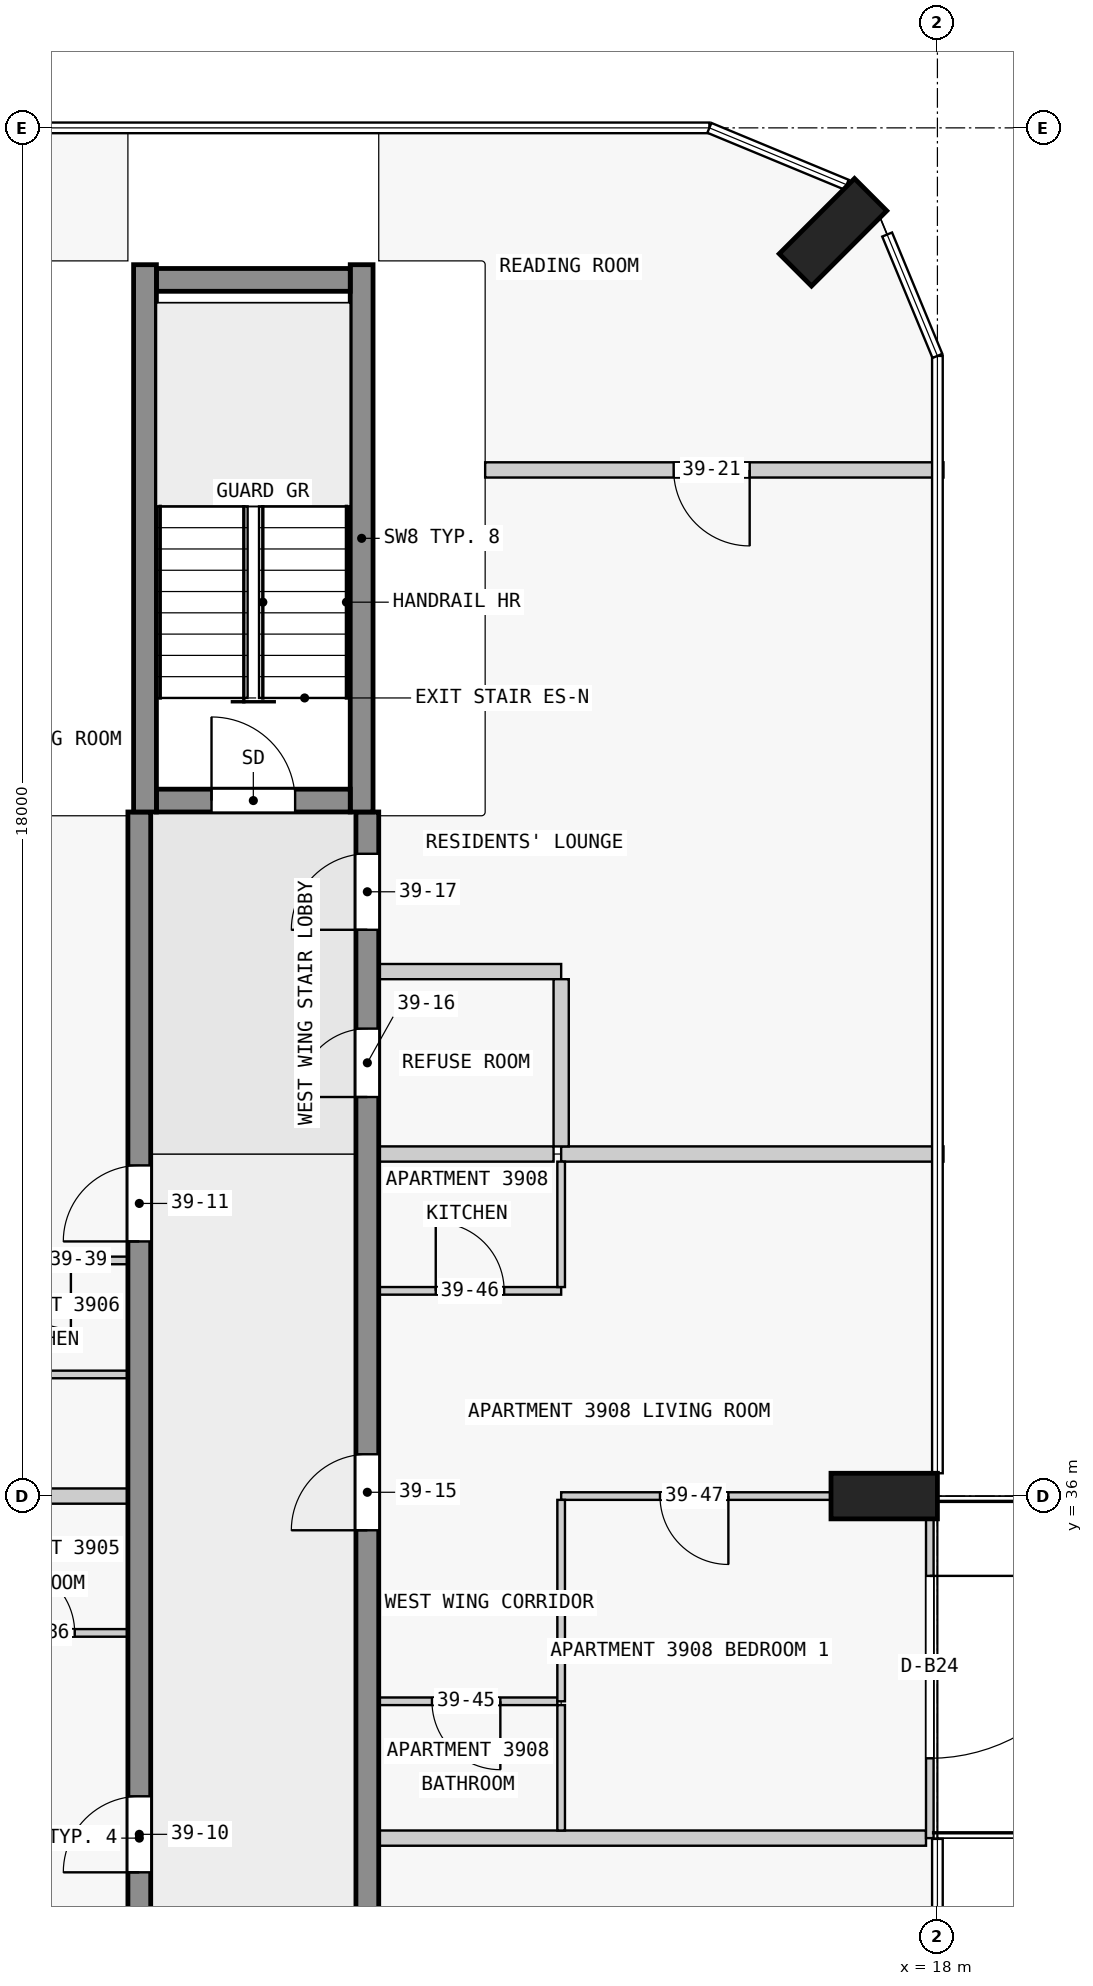
"""IFC4 building model, lengths in metres.
Left out: names, types, materials, properties, quantities, classifications, styles, units other than length and angle.
Written with IfcOpenShell. Run it as: python <this file> out.ifc"""

import sys

from ifc_helpers import new_model, si_unit, direction, frame, frame_2d, origin, origin_2d, place, context, subcontext, project, spatial, rectangle, extrude, element, fill, save


model = new_model("IFC4")
c1 = context("Model", 3, precision=1e-05, world=origin(), true_north=direction((0.0, 1.0)))
c2 = subcontext(c1, "Body", "Model", "MODEL_VIEW")
j1 = project(units=[si_unit("LENGTHUNIT", "METRE"), si_unit("PLANEANGLEUNIT", "RADIAN")], contexts=[c1])
p1 = place(None, origin())
s1 = spatial("IfcSite", under=j1, at=p1, CompositionType="ELEMENT")
p2 = place(p1, origin())
s2 = spatial("IfcBuilding", under=s1, at=p2, CompositionType="ELEMENT")
p3 = place(p2, frame((0.0, 0.0, 153.4)))
s3 = spatial("IfcBuildingStorey", under=s2, at=p3, CompositionType="ELEMENT", Elevation=153.4)
for number, where, z_axis, x_axis in (
    (1, (17.3, 36.0, 0.0), (0.0, 0.0, 1.0), (0.0, 1.0, 0.0)),
    (2, (16.626, 52.626, 0.0), (0.0, 0.0, 1.0), (-0.707, 0.707, 0.0)),
):
    element("IfcColumn", number, at=place(p3, frame(where, z_axis=z_axis, x_axis=x_axis)), inside=s3, PredefinedType="COLUMN", context=c2, shape_type="SweptSolid", body=[
        extrude(rectangle(XDim=0.6, YDim=1.4, at=origin_2d()), origin(), (0.0, 0.0, 1.0), 3.5),
    ])
p4 = place(p3, frame((7.725, 45.15, 0.0), z_axis=(0.0, 0.0, 1.0), x_axis=(1.0, 0.0, 0.0)))
e3 = element("IfcWall", 3, at=p4, inside=s3, PredefinedType="SHEAR", context=c2, shape_type="SweptSolid", body=[
    extrude(rectangle(XDim=2.55, YDim=0.3, at=frame_2d((1.275, 0.0))), origin(), (0.0, 0.0, 1.0), 3.5),
])
p5 = place(p4, frame((0.725, 0.0, 0.0)))
e4 = element("IfcOpeningElement", 4, at=p5, cuts=e3, PredefinedType="OPENING", context=c2, shape_type="SweptSolid", body=[
    extrude(rectangle(XDim=1.1, YDim=2.1, at=frame_2d((0.55, 1.05))), frame((0.0, 0.16, 0.0), z_axis=(0.0, -1.0, 0.0), x_axis=(1.0, 0.0, 0.0)), (0.0, 0.0, 1.0), 0.32),
])
p6 = place(p3, frame((7.725, 52.0, 0.0), z_axis=(0.0, 0.0, 1.0), x_axis=(1.0, 0.0, 0.0)))
e5 = element("IfcWall", 5, at=p6, inside=s3, PredefinedType="SHEAR", context=c2, shape_type="SweptSolid", body=[
    extrude(rectangle(XDim=2.55, YDim=0.3, at=frame_2d((1.275, 0.0))), origin(), (0.0, 0.0, 1.0), 3.5),
])
for number, where, z_axis, x_axis in (
    (6, (7.575, 45.0, 0.0), (0.0, 0.0, 1.0), (0.0, 1.0, 0.0)),
    (7, (10.425, 45.0, 0.0), (0.0, 0.0, 1.0), (0.0, 1.0, 0.0)),
):
    element("IfcWall", number, at=place(p3, frame(where, z_axis=z_axis, x_axis=x_axis)), inside=s3, PredefinedType="SHEAR", context=c2, shape_type="SweptSolid", body=[
        extrude(rectangle(XDim=7.2, YDim=0.3, at=frame_2d((3.6, 0.0))), origin(), (0.0, 0.0, 1.0), 3.5),
    ])
p7 = place(p3, frame((7.5, 18.0, 0.0), z_axis=(0.0, 0.0, 1.0), x_axis=(0.0, 1.0, 0.0)))
e8 = element("IfcWall", 8, at=p7, inside=s3, PredefinedType="SHEAR", context=c2, shape_type="SweptSolid", body=[
    extrude(rectangle(XDim=27.0, YDim=0.3, at=frame_2d((13.5, 0.0))), origin(), (0.0, 0.0, 1.0), 3.25),
])
p8 = place(p7, frame((1.75, 0.0, 0.0)))
e9 = element("IfcOpeningElement", 9, at=p8, cuts=e8, PredefinedType="OPENING", context=c2, shape_type="SweptSolid", body=[
    extrude(rectangle(XDim=1.0, YDim=2.1, at=frame_2d((0.5, 1.05))), frame((0.0, 0.16, 0.0), z_axis=(0.0, -1.0, 0.0), x_axis=(1.0, 0.0, 0.0)), (0.0, 0.0, 1.0), 0.32),
])
p9 = place(p7, frame((5.85, 0.0, 0.0)))
e10 = element("IfcOpeningElement", 10, at=p9, cuts=e8, PredefinedType="OPENING", context=c2, shape_type="SweptSolid", body=[
    extrude(rectangle(XDim=1.8, YDim=2.1, at=frame_2d((0.9, 1.05))), frame((0.0, 0.16, 0.0), z_axis=(0.0, -1.0, 0.0), x_axis=(1.0, 0.0, 0.0)), (0.0, 0.0, 1.0), 0.32),
])
p10 = place(p7, frame((13.05, 0.0, 0.0)))
e11 = element("IfcOpeningElement", 11, at=p10, cuts=e8, PredefinedType="OPENING", context=c2, shape_type="SweptSolid", body=[
    extrude(rectangle(XDim=1.0, YDim=2.1, at=frame_2d((0.5, 1.05))), frame((0.0, 0.16, 0.0), z_axis=(0.0, -1.0, 0.0), x_axis=(1.0, 0.0, 0.0)), (0.0, 0.0, 1.0), 0.32),
])
p11 = place(p7, frame((21.35, 0.0, 0.0)))
e12 = element("IfcOpeningElement", 12, at=p11, cuts=e8, PredefinedType="OPENING", context=c2, shape_type="SweptSolid", body=[
    extrude(rectangle(XDim=1.0, YDim=2.1, at=frame_2d((0.5, 1.05))), frame((0.0, 0.16, 0.0), z_axis=(0.0, -1.0, 0.0), x_axis=(1.0, 0.0, 0.0)), (0.0, 0.0, 1.0), 0.32),
])
p12 = place(p3, frame((10.5, 18.0, 0.0), z_axis=(0.0, 0.0, 1.0), x_axis=(0.0, 1.0, 0.0)))
e13 = element("IfcWall", 13, at=p12, inside=s3, PredefinedType="SHEAR", context=c2, shape_type="SweptSolid", body=[
    extrude(rectangle(XDim=27.0, YDim=0.3, at=frame_2d((13.5, 0.0))), origin(), (0.0, 0.0, 1.0), 3.25),
])
p13 = place(p12, frame((1.85, 0.0, 0.0)))
e14 = element("IfcOpeningElement", 14, at=p13, cuts=e13, PredefinedType="OPENING", context=c2, shape_type="SweptSolid", body=[
    extrude(rectangle(XDim=0.9, YDim=2.1, at=frame_2d((0.45, 1.05))), frame((0.0, 0.16, 0.0), z_axis=(0.0, -1.0, 0.0), x_axis=(1.0, 0.0, 0.0)), (0.0, 0.0, 1.0), 0.32),
])
p14 = place(p12, frame((6.25, 0.0, 0.0)))
e15 = element("IfcOpeningElement", 15, at=p14, cuts=e13, PredefinedType="OPENING", context=c2, shape_type="SweptSolid", body=[
    extrude(rectangle(XDim=1.0, YDim=2.1, at=frame_2d((0.5, 1.05))), frame((0.0, 0.16, 0.0), z_axis=(0.0, -1.0, 0.0), x_axis=(1.0, 0.0, 0.0)), (0.0, 0.0, 1.0), 0.32),
])
p15 = place(p12, frame((10.85, 0.0, 0.0)))
e16 = element("IfcOpeningElement", 16, at=p15, cuts=e13, PredefinedType="OPENING", context=c2, shape_type="SweptSolid", body=[
    extrude(rectangle(XDim=0.9, YDim=2.1, at=frame_2d((0.45, 1.05))), frame((0.0, 0.16, 0.0), z_axis=(0.0, -1.0, 0.0), x_axis=(1.0, 0.0, 0.0)), (0.0, 0.0, 1.0), 0.32),
])
p16 = place(p12, frame((17.55, 0.0, 0.0)))
e17 = element("IfcOpeningElement", 17, at=p16, cuts=e13, PredefinedType="OPENING", context=c2, shape_type="SweptSolid", body=[
    extrude(rectangle(XDim=1.0, YDim=2.1, at=frame_2d((0.5, 1.05))), frame((0.0, 0.16, 0.0), z_axis=(0.0, -1.0, 0.0), x_axis=(1.0, 0.0, 0.0)), (0.0, 0.0, 1.0), 0.32),
])
p17 = place(p12, frame((23.25, 0.0, 0.0)))
e18 = element("IfcOpeningElement", 18, at=p17, cuts=e13, PredefinedType="OPENING", context=c2, shape_type="SweptSolid", body=[
    extrude(rectangle(XDim=0.9, YDim=2.1, at=frame_2d((0.45, 1.05))), frame((0.0, 0.16, 0.0), z_axis=(0.0, -1.0, 0.0), x_axis=(1.0, 0.0, 0.0)), (0.0, 0.0, 1.0), 0.32),
])
p18 = place(p12, frame((25.45, 0.0, 0.0)))
e19 = element("IfcOpeningElement", 19, at=p18, cuts=e13, PredefinedType="OPENING", context=c2, shape_type="SweptSolid", body=[
    extrude(rectangle(XDim=1.0, YDim=2.1, at=frame_2d((0.5, 1.05))), frame((0.0, 0.16, 0.0), z_axis=(0.0, -1.0, 0.0), x_axis=(1.0, 0.0, 0.0)), (0.0, 0.0, 1.0), 0.32),
])
p19 = place(p3, frame((17.9, 36.0, 0.0), z_axis=(0.0, 0.0, 1.0), x_axis=(0.0, -1.0, 0.0)))
e20 = element("IfcWall", 20, at=p19, inside=s3, PredefinedType="STANDARD", context=c2, shape_type="SweptSolid", body=[
    extrude(rectangle(XDim=4.5, YDim=0.1, at=frame_2d((2.25, 0.0))), origin(), (0.0, 0.0, 1.0), 3.25),
])
p20 = place(p19, frame((1.05, 0.0, 0.0)))
e21 = element("IfcOpeningElement", 21, at=p20, cuts=e20, PredefinedType="OPENING", context=c2, shape_type="SweptSolid", body=[
    extrude(rectangle(XDim=2.4, YDim=2.4, at=frame_2d((1.2, 1.2))), frame((0.0, 0.06, 0.0), z_axis=(0.0, -1.0, 0.0), x_axis=(1.0, 0.0, 0.0)), (0.0, 0.0, 1.0), 0.12),
])
p21 = place(p3, frame((17.85, 31.5, 0.0), z_axis=(0.0, 0.0, 1.0), x_axis=(-1.0, 0.0, 0.0)))
e22 = element("IfcWall", 22, at=p21, inside=s3, PredefinedType="PARTITIONING", context=c2, shape_type="SweptSolid", body=[
    extrude(rectangle(XDim=7.2, YDim=0.2, at=frame_2d((3.6, 0.0))), origin(), (0.0, 0.0, 1.0), 3.25),
])
p22 = place(p3, frame((13.0, 33.3, 0.0), z_axis=(0.0, 0.0, 1.0), x_axis=(-1.0, 0.0, 0.0)))
e23 = element("IfcWall", 23, at=p22, inside=s3, PredefinedType="PARTITIONING", context=c2, shape_type="SweptSolid", body=[
    extrude(rectangle(XDim=2.35, YDim=0.1, at=frame_2d((1.175, 0.0))), origin(), (0.0, 0.0, 1.0), 3.25),
])
p23 = place(p22, frame((0.75, 0.0, 0.0)))
e24 = element("IfcOpeningElement", 24, at=p23, cuts=e23, PredefinedType="OPENING", context=c2, shape_type="SweptSolid", body=[
    extrude(rectangle(XDim=0.9, YDim=2.1, at=frame_2d((0.45, 1.05))), frame((0.0, 0.06, 0.0), z_axis=(0.0, -1.0, 0.0), x_axis=(1.0, 0.0, 0.0)), (0.0, 0.0, 1.0), 0.12),
])
p24 = place(p3, frame((5.0, 34.2, 0.0), z_axis=(0.0, 0.0, 1.0), x_axis=(1.0, 0.0, 0.0)))
e25 = element("IfcWall", 25, at=p24, inside=s3, PredefinedType="PARTITIONING", context=c2, shape_type="SweptSolid", body=[
    extrude(rectangle(XDim=2.35, YDim=0.1, at=frame_2d((1.175, 0.0))), origin(), (0.0, 0.0, 1.0), 3.25),
])
p25 = place(p24, frame((0.75, 0.0, 0.0)))
e26 = element("IfcOpeningElement", 26, at=p25, cuts=e25, PredefinedType="OPENING", context=c2, shape_type="SweptSolid", body=[
    extrude(rectangle(XDim=0.9, YDim=2.1, at=frame_2d((0.45, 1.05))), frame((0.0, 0.06, 0.0), z_axis=(0.0, -1.0, 0.0), x_axis=(1.0, 0.0, 0.0)), (0.0, 0.0, 1.0), 0.12),
])
p26 = place(p3, frame((16.6, 36.0, 0.0), z_axis=(0.0, 0.0, 1.0), x_axis=(-1.0, 0.0, 0.0)))
e27 = element("IfcWall", 27, at=p26, inside=s3, PredefinedType="PARTITIONING", context=c2, shape_type="SweptSolid", body=[
    extrude(rectangle(XDim=3.55, YDim=0.1, at=frame_2d((1.775, 0.0))), origin(), (0.0, 0.0, 1.0), 3.25),
])
p27 = place(p26, frame((1.35, 0.0, 0.0)))
e28 = element("IfcOpeningElement", 28, at=p27, cuts=e27, PredefinedType="OPENING", context=c2, shape_type="SweptSolid", body=[
    extrude(rectangle(XDim=0.9, YDim=2.1, at=frame_2d((0.45, 1.05))), frame((0.0, 0.06, 0.0), z_axis=(0.0, -1.0, 0.0), x_axis=(1.0, 0.0, 0.0)), (0.0, 0.0, 1.0), 0.12),
])
p28 = place(p3, frame((7.35, 36.0, 0.0), z_axis=(0.0, 0.0, 1.0), x_axis=(-1.0, 0.0, 0.0)))
e29 = element("IfcWall", 29, at=p28, inside=s3, PredefinedType="PARTITIONING", context=c2, shape_type="SweptSolid", body=[
    extrude(rectangle(XDim=5.95, YDim=0.2, at=frame_2d((2.975, 0.0))), origin(), (0.0, 0.0, 1.0), 3.25),
])
p29 = place(p3, frame((7.35, 37.6, 0.0), z_axis=(0.0, 0.0, 1.0), x_axis=(-1.0, 0.0, 0.0)))
e30 = element("IfcWall", 30, at=p29, inside=s3, PredefinedType="PARTITIONING", context=c2, shape_type="SweptSolid", body=[
    extrude(rectangle(XDim=2.35, YDim=0.1, at=frame_2d((1.175, 0.0))), origin(), (0.0, 0.0, 1.0), 3.25),
])
p30 = place(p3, frame((10.65, 38.7, 0.0), z_axis=(0.0, 0.0, 1.0), x_axis=(1.0, 0.0, 0.0)))
e31 = element("IfcWall", 31, at=p30, inside=s3, PredefinedType="PARTITIONING", context=c2, shape_type="SweptSolid", body=[
    extrude(rectangle(XDim=2.4, YDim=0.1, at=frame_2d((1.2, 0.0))), origin(), (0.0, 0.0, 1.0), 3.25),
])
p31 = place(p30, frame((0.75, 0.0, 0.0)))
e32 = element("IfcOpeningElement", 32, at=p31, cuts=e31, PredefinedType="OPENING", context=c2, shape_type="SweptSolid", body=[
    extrude(rectangle(XDim=0.9, YDim=2.1, at=frame_2d((0.45, 1.05))), frame((0.0, 0.06, 0.0), z_axis=(0.0, -1.0, 0.0), x_axis=(1.0, 0.0, 0.0)), (0.0, 0.0, 1.0), 0.12),
])
p32 = place(p3, frame((7.35, 39.1, 0.0), z_axis=(0.0, 0.0, 1.0), x_axis=(-1.0, 0.0, 0.0)))
e33 = element("IfcWall", 33, at=p32, inside=s3, PredefinedType="PARTITIONING", context=c2, shape_type="SweptSolid", body=[
    extrude(rectangle(XDim=2.35, YDim=0.1, at=frame_2d((1.175, 0.0))), origin(), (0.0, 0.0, 1.0), 3.25),
])
p33 = place(p32, frame((0.75, 0.0, 0.0)))
e34 = element("IfcOpeningElement", 34, at=p33, cuts=e33, PredefinedType="OPENING", context=c2, shape_type="SweptSolid", body=[
    extrude(rectangle(XDim=0.9, YDim=2.1, at=frame_2d((0.45, 1.05))), frame((0.0, 0.06, 0.0), z_axis=(0.0, -1.0, 0.0), x_axis=(1.0, 0.0, 0.0)), (0.0, 0.0, 1.0), 0.12),
])
p34 = place(p3, frame((12.95, 40.5, 0.0), z_axis=(0.0, 0.0, 1.0), x_axis=(-1.0, 0.0, 0.0)))
e35 = element("IfcWall", 35, at=p34, inside=s3, PredefinedType="PARTITIONING", context=c2, shape_type="SweptSolid", body=[
    extrude(rectangle(XDim=2.3, YDim=0.2, at=frame_2d((1.15, 0.0))), origin(), (0.0, 0.0, 1.0), 3.25),
])
p35 = place(p3, frame((13.05, 40.5, 0.0), z_axis=(0.0, 0.0, 1.0), x_axis=(1.0, 0.0, 0.0)))
e36 = element("IfcWall", 36, at=p35, inside=s3, PredefinedType="PARTITIONING", context=c2, shape_type="SweptSolid", body=[
    extrude(rectangle(XDim=5.03, YDim=0.2, at=frame_2d((2.515, 0.0))), origin(), (0.0, 0.0, 1.0), 3.25),
])
p36 = place(p3, frame((13.05, 42.9, 0.0), z_axis=(0.0, 0.0, 1.0), x_axis=(-1.0, 0.0, 0.0)))
e37 = element("IfcWall", 37, at=p36, inside=s3, PredefinedType="PARTITIONING", context=c2, shape_type="SweptSolid", body=[
    extrude(rectangle(XDim=2.4, YDim=0.2, at=frame_2d((1.2, 0.0))), origin(), (0.0, 0.0, 1.0), 3.25),
])
p37 = place(p3, frame((18.08, 49.5, 0.0), z_axis=(0.0, 0.0, 1.0), x_axis=(-1.0, 0.0, 0.0)))
e38 = element("IfcWall", 38, at=p37, inside=s3, PredefinedType="PARTITIONING", context=c2, shape_type="SweptSolid", body=[
    extrude(rectangle(XDim=6.03, YDim=0.2, at=frame_2d((3.015, 0.0))), origin(), (0.0, 0.0, 1.0), 3.25),
])
p38 = place(p37, frame((2.55, 0.0, 0.0)))
e39 = element("IfcOpeningElement", 39, at=p38, cuts=e38, PredefinedType="OPENING", context=c2, shape_type="SweptSolid", body=[
    extrude(rectangle(XDim=1.0, YDim=2.1, at=frame_2d((0.5, 1.05))), frame((0.0, 0.11, 0.0), z_axis=(0.0, -1.0, 0.0), x_axis=(1.0, 0.0, 0.0)), (0.0, 0.0, 1.0), 0.22),
])
p39 = place(p3, frame((13.05, 35.95, 0.0), z_axis=(0.0, 0.0, 1.0), x_axis=(0.0, -1.0, 0.0)))
e40 = element("IfcWall", 40, at=p39, inside=s3, PredefinedType="PARTITIONING", context=c2, shape_type="SweptSolid", body=[
    extrude(rectangle(XDim=2.65, YDim=0.1, at=frame_2d((1.325, 0.0))), origin(), (0.0, 0.0, 1.0), 3.25),
])
for number, where, z_axis, x_axis in (
    (41, (13.05, 31.6, 0.0), (0.0, 0.0, 1.0), (0.0, 1.0, 0.0)),
    (42, (13.05, 38.75, 0.0), (0.0, 0.0, 1.0), (0.0, 1.0, 0.0)),
):
    element("IfcWall", number, at=place(p3, frame(where, z_axis=z_axis, x_axis=x_axis)), inside=s3, PredefinedType="PARTITIONING", context=c2, shape_type="SweptSolid", body=[
        extrude(rectangle(XDim=1.65, YDim=0.1, at=frame_2d((0.825, 0.0))), origin(), (0.0, 0.0, 1.0), 3.25),
    ])
p40 = place(p3, frame((13.05, 40.6, 0.0), z_axis=(0.0, 0.0, 1.0), x_axis=(0.0, 1.0, 0.0)))
e43 = element("IfcWall", 43, at=p40, inside=s3, PredefinedType="PARTITIONING", context=c2, shape_type="SweptSolid", body=[
    extrude(rectangle(XDim=2.2, YDim=0.2, at=frame_2d((1.1, 0.0))), origin(), (0.0, 0.0, 1.0), 3.25),
])
p41 = place(p20, origin())
e44 = element("IfcDoor", 44, at=p41, inside=s3, OperationType="SINGLE_SWING_LEFT", PredefinedType="DOOR", context=c2, shape_type="SweptSolid", body=[
    extrude(rectangle(XDim=2.4, YDim=2.4, at=frame_2d((1.2, 1.2))), frame((0.0, 0.025, 0.0), z_axis=(0.0, -1.0, 0.0), x_axis=(1.0, 0.0, 0.0)), (0.0, 0.0, 1.0), 0.05),
])
fill(e21, e44)
p42 = place(p5, origin())
e45 = element("IfcDoor", 45, at=p42, inside=s3, OperationType="SINGLE_SWING_LEFT", PredefinedType="DOOR", context=c2, shape_type="SweptSolid", body=[
    extrude(rectangle(XDim=1.1, YDim=2.1, at=frame_2d((0.55, 1.05))), frame((0.0, 0.025, 0.0), z_axis=(0.0, -1.0, 0.0), x_axis=(1.0, 0.0, 0.0)), (0.0, 0.0, 1.0), 0.05),
])
fill(e4, e45)
p43 = place(p10, origin())
e46 = element("IfcDoor", 46, at=p43, inside=s3, OperationType="SINGLE_SWING_RIGHT", PredefinedType="DOOR", context=c2, shape_type="SweptSolid", body=[
    extrude(rectangle(XDim=1.0, YDim=2.1, at=frame_2d((0.5, 1.05))), frame((0.0, 0.025, 0.0), z_axis=(0.0, -1.0, 0.0), x_axis=(1.0, 0.0, 0.0)), (0.0, 0.0, 1.0), 0.05),
])
fill(e11, e46)
p44 = place(p11, origin())
e47 = element("IfcDoor", 47, at=p44, inside=s3, OperationType="SINGLE_SWING_RIGHT", PredefinedType="DOOR", context=c2, shape_type="SweptSolid", body=[
    extrude(rectangle(XDim=1.0, YDim=2.1, at=frame_2d((0.5, 1.05))), frame((0.0, 0.025, 0.0), z_axis=(0.0, -1.0, 0.0), x_axis=(1.0, 0.0, 0.0)), (0.0, 0.0, 1.0), 0.05),
])
fill(e12, e47)
p45 = place(p16, origin())
e48 = element("IfcDoor", 48, at=p45, inside=s3, OperationType="SINGLE_SWING_RIGHT", PredefinedType="DOOR", context=c2, shape_type="SweptSolid", body=[
    extrude(rectangle(XDim=1.0, YDim=2.1, at=frame_2d((0.5, 1.05))), frame((0.0, 0.025, 0.0), z_axis=(0.0, -1.0, 0.0), x_axis=(1.0, 0.0, 0.0)), (0.0, 0.0, 1.0), 0.05),
])
fill(e17, e48)
p46 = place(p17, origin())
e49 = element("IfcDoor", 49, at=p46, inside=s3, OperationType="SINGLE_SWING_RIGHT", PredefinedType="DOOR", context=c2, shape_type="SweptSolid", body=[
    extrude(rectangle(XDim=0.9, YDim=2.1, at=frame_2d((0.45, 1.05))), frame((0.0, 0.025, 0.0), z_axis=(0.0, -1.0, 0.0), x_axis=(1.0, 0.0, 0.0)), (0.0, 0.0, 1.0), 0.05),
])
fill(e18, e49)
p47 = place(p18, origin())
e50 = element("IfcDoor", 50, at=p47, inside=s3, OperationType="SINGLE_SWING_RIGHT", PredefinedType="DOOR", context=c2, shape_type="SweptSolid", body=[
    extrude(rectangle(XDim=1.0, YDim=2.1, at=frame_2d((0.5, 1.05))), frame((0.0, 0.025, 0.0), z_axis=(0.0, -1.0, 0.0), x_axis=(1.0, 0.0, 0.0)), (0.0, 0.0, 1.0), 0.05),
])
fill(e19, e50)
p48 = place(p38, origin())
e51 = element("IfcDoor", 51, at=p48, inside=s3, OperationType="SINGLE_SWING_RIGHT", PredefinedType="DOOR", context=c2, shape_type="SweptSolid", body=[
    extrude(rectangle(XDim=1.0, YDim=2.1, at=frame_2d((0.5, 1.05))), frame((0.0, 0.025, 0.0), z_axis=(0.0, -1.0, 0.0), x_axis=(1.0, 0.0, 0.0)), (0.0, 0.0, 1.0), 0.05),
])
fill(e39, e51)
p49 = place(p25, origin())
e52 = element("IfcDoor", 52, at=p49, inside=s3, OperationType="SINGLE_SWING_RIGHT", PredefinedType="DOOR", context=c2, shape_type="SweptSolid", body=[
    extrude(rectangle(XDim=0.9, YDim=2.1, at=frame_2d((0.45, 1.05))), frame((0.0, 0.025, 0.0), z_axis=(0.0, -1.0, 0.0), x_axis=(1.0, 0.0, 0.0)), (0.0, 0.0, 1.0), 0.05),
])
fill(e26, e52)
p50 = place(p33, origin())
e53 = element("IfcDoor", 53, at=p50, inside=s3, OperationType="SINGLE_SWING_RIGHT", PredefinedType="DOOR", context=c2, shape_type="SweptSolid", body=[
    extrude(rectangle(XDim=0.9, YDim=2.1, at=frame_2d((0.45, 1.05))), frame((0.0, 0.025, 0.0), z_axis=(0.0, -1.0, 0.0), x_axis=(1.0, 0.0, 0.0)), (0.0, 0.0, 1.0), 0.05),
])
fill(e34, e53)
p51 = place(p23, origin())
e54 = element("IfcDoor", 54, at=p51, inside=s3, OperationType="SINGLE_SWING_RIGHT", PredefinedType="DOOR", context=c2, shape_type="SweptSolid", body=[
    extrude(rectangle(XDim=0.9, YDim=2.1, at=frame_2d((0.45, 1.05))), frame((0.0, 0.025, 0.0), z_axis=(0.0, -1.0, 0.0), x_axis=(1.0, 0.0, 0.0)), (0.0, 0.0, 1.0), 0.05),
])
fill(e24, e54)
p52 = place(p31, origin())
e55 = element("IfcDoor", 55, at=p52, inside=s3, OperationType="SINGLE_SWING_LEFT", PredefinedType="DOOR", context=c2, shape_type="SweptSolid", body=[
    extrude(rectangle(XDim=0.9, YDim=2.1, at=frame_2d((0.45, 1.05))), frame((0.0, 0.025, 0.0), z_axis=(0.0, -1.0, 0.0), x_axis=(1.0, 0.0, 0.0)), (0.0, 0.0, 1.0), 0.05),
])
fill(e32, e55)
p53 = place(p27, origin())
e56 = element("IfcDoor", 56, at=p53, inside=s3, OperationType="SINGLE_SWING_RIGHT", PredefinedType="DOOR", context=c2, shape_type="SweptSolid", body=[
    extrude(rectangle(XDim=0.9, YDim=2.1, at=frame_2d((0.45, 1.05))), frame((0.0, 0.025, 0.0), z_axis=(0.0, -1.0, 0.0), x_axis=(1.0, 0.0, 0.0)), (0.0, 0.0, 1.0), 0.05),
])
fill(e28, e56)
save(model, sys.argv[1])
